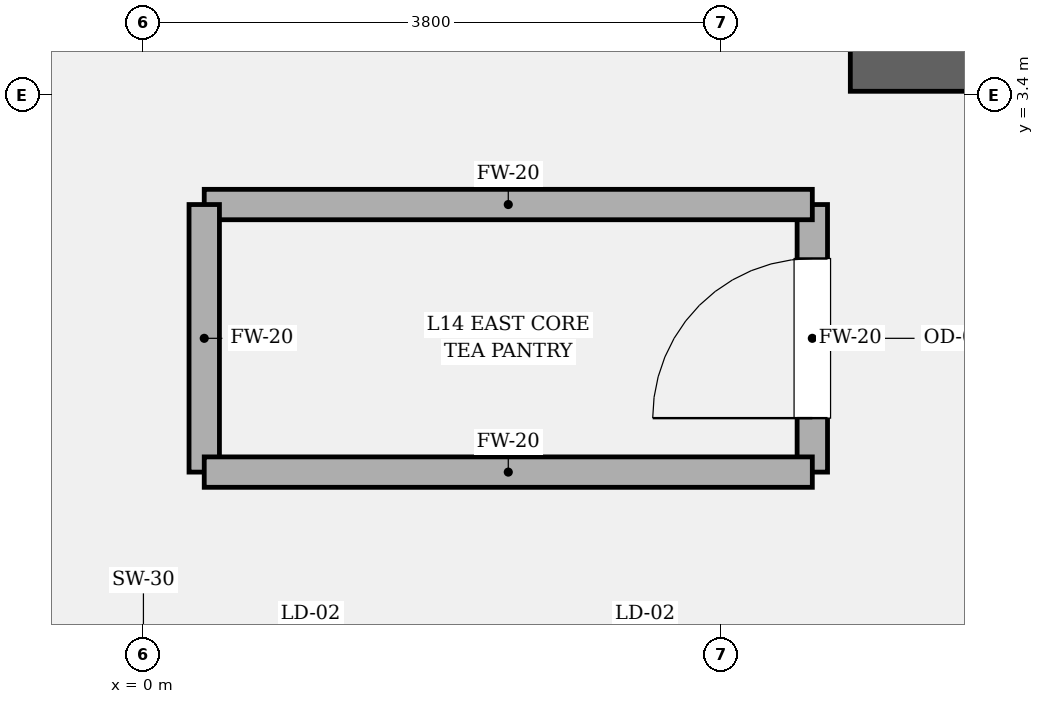
"""IFC4 building model, lengths in metres.
Left out: names, types, materials, properties, quantities, classifications, styles, units other than length and angle.
Written with IfcOpenShell. Run it as: python <this file> out.ifc"""

import sys

from ifc_helpers import new_model, si_unit, direction, frame, frame_2d, origin, place, context, subcontext, project, spatial, rectangle, extrude, element, fill, save


model = new_model("IFC4")
c1 = context("Model", 3, precision=1e-05, world=origin(), true_north=direction((0.0, 1.0)))
c2 = subcontext(c1, "Body", "Model", "MODEL_VIEW")
j1 = project(units=[si_unit("LENGTHUNIT", "METRE"), si_unit("PLANEANGLEUNIT", "RADIAN")], contexts=[c1])
p1 = place(None, origin())
s1 = spatial("IfcSite", under=j1, at=p1, CompositionType="ELEMENT")
p2 = place(p1, origin())
s2 = spatial("IfcBuilding", under=s1, at=p2, CompositionType="ELEMENT")
p3 = place(p2, frame((0.0, 0.0, 64.65)))
s3 = spatial("IfcBuildingStorey", under=s2, at=p3, CompositionType="ELEMENT", Elevation=64.65)
p4 = place(p3, frame((4.65, 3.6, 0.0), z_axis=(0.0, 0.0, 1.0), x_axis=(1.0, 0.0, 0.0)))
e1 = element("IfcWall", 1, at=p4, inside=s3, PredefinedType="SOLIDWALL", context=c2, shape_type="SweptSolid", body=[
    extrude(rectangle(XDim=5.175, YDim=0.35, at=frame_2d((2.587, 0.0))), origin(), (0.0, 0.0, 1.0), 4.05),
])
p5 = place(p3, frame((4.4, 0.92, 0.0), z_axis=(0.0, 0.0, 1.0), x_axis=(0.0, 1.0, 0.0)))
e2 = element("IfcWall", 2, at=p5, inside=s3, PredefinedType="SOLIDWALL", context=c2, shape_type="SweptSolid", body=[
    extrude(rectangle(XDim=1.76, YDim=0.2, at=frame_2d((0.88, 0.0))), origin(), (0.0, 0.0, 1.0), 3.81),
])
p6 = place(p5, frame((0.355, 0.0, 0.0)))
e3 = element("IfcOpeningElement", 3, at=p6, cuts=e2, PredefinedType="OPENING", context=c2, shape_type="SweptSolid", body=[
    extrude(rectangle(XDim=1.05, YDim=2.2, at=frame_2d((0.525, 1.1))), frame((0.0, 0.11, 0.0), z_axis=(0.0, -1.0, 0.0), x_axis=(1.0, 0.0, 0.0)), (0.0, 0.0, 1.0), 0.22),
])
p7 = place(p3, frame((4.4, 2.68, 0.0), z_axis=(0.0, 0.0, 1.0), x_axis=(-1.0, 0.0, 0.0)))
e4 = element("IfcWall", 4, at=p7, inside=s3, PredefinedType="SOLIDWALL", context=c2, shape_type="SweptSolid", body=[
    extrude(rectangle(XDim=4.0, YDim=0.2, at=frame_2d((2.0, 0.0))), origin(), (0.0, 0.0, 1.0), 3.81),
])
p8 = place(p3, frame((0.4, 2.68, 0.0), z_axis=(0.0, 0.0, 1.0), x_axis=(0.0, -1.0, 0.0)))
e5 = element("IfcWall", 5, at=p8, inside=s3, PredefinedType="SOLIDWALL", context=c2, shape_type="SweptSolid", body=[
    extrude(rectangle(XDim=1.76, YDim=0.2, at=frame_2d((0.88, 0.0))), origin(), (0.0, 0.0, 1.0), 3.81),
])
p9 = place(p3, frame((0.4, 0.92, 0.0), z_axis=(0.0, 0.0, 1.0), x_axis=(1.0, 0.0, 0.0)))
e6 = element("IfcWall", 6, at=p9, inside=s3, PredefinedType="SOLIDWALL", context=c2, shape_type="SweptSolid", body=[
    extrude(rectangle(XDim=4.0, YDim=0.2, at=frame_2d((2.0, 0.0))), origin(), (0.0, 0.0, 1.0), 3.81),
])
p10 = place(p6, origin())
e7 = element("IfcDoor", 7, at=p10, inside=s3, OperationType="SINGLE_SWING_LEFT", PredefinedType="DOOR", context=c2, shape_type="SweptSolid", body=[
    extrude(rectangle(XDim=1.05, YDim=2.2, at=frame_2d((0.525, 1.1))), frame((0.0, 0.025, 0.0), z_axis=(0.0, -1.0, 0.0), x_axis=(1.0, 0.0, 0.0)), (0.0, 0.0, 1.0), 0.05),
])
fill(e3, e7)
save(model, sys.argv[1])
